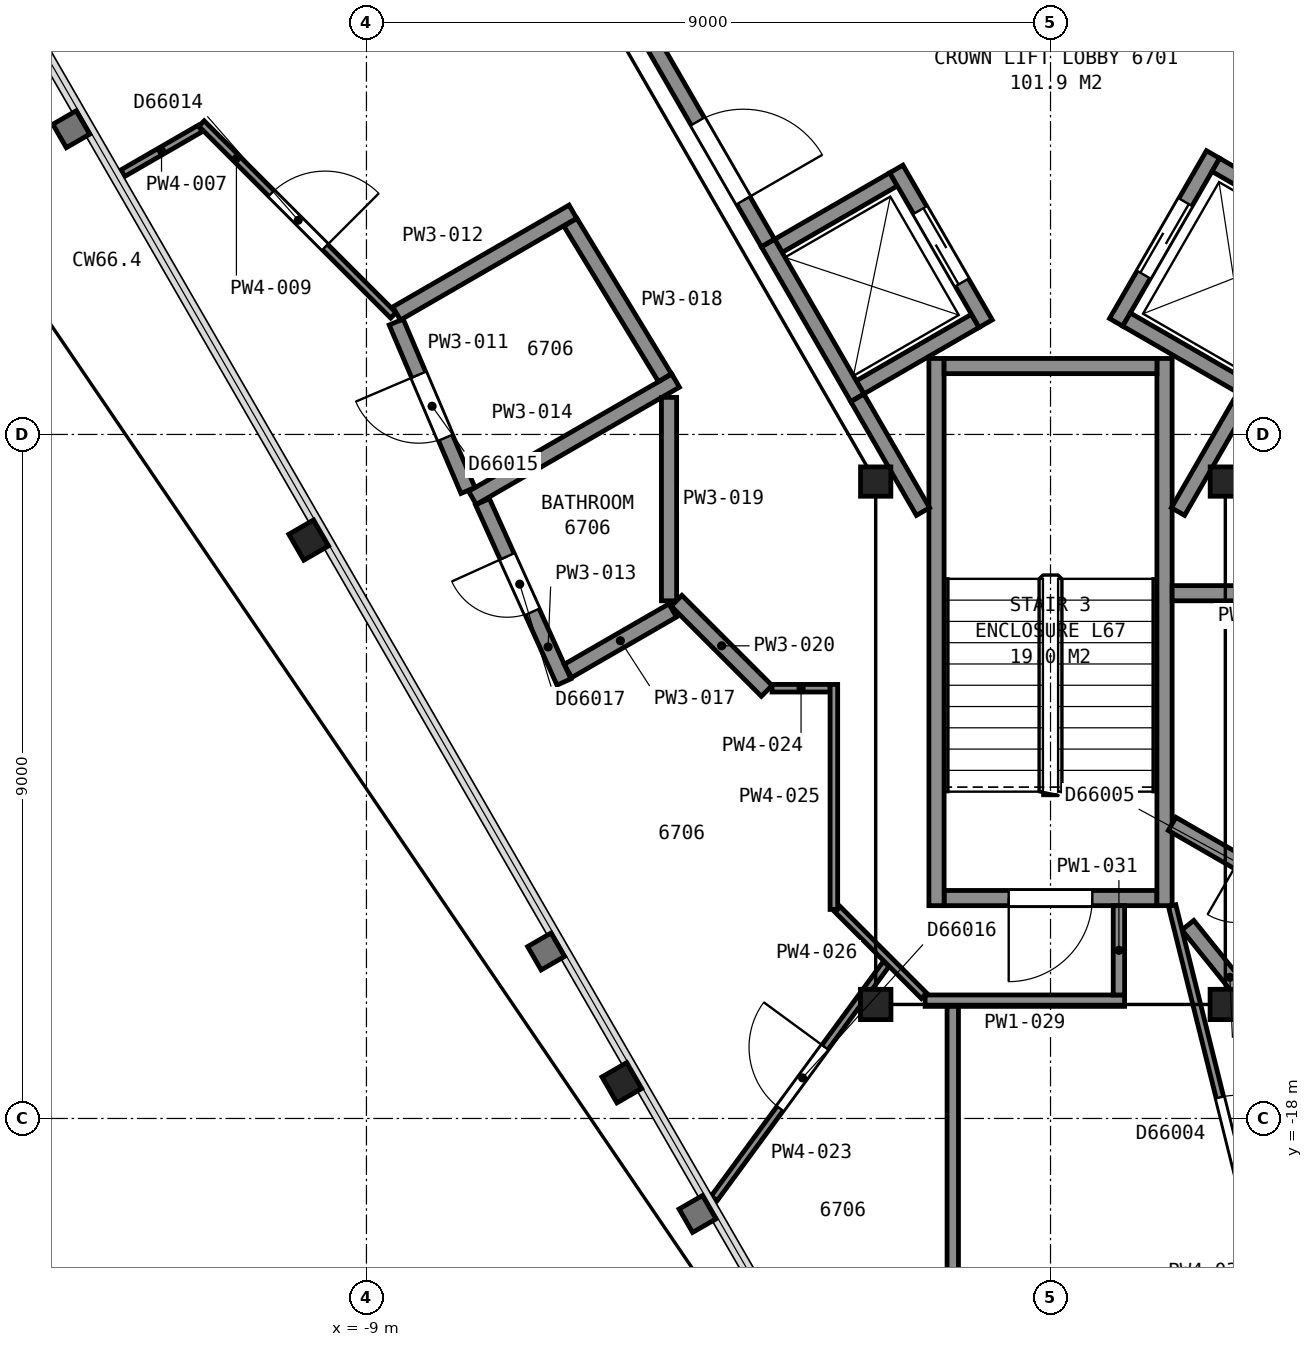
"""IFC4 building model, lengths in metres.
Left out: names, types, materials, properties, quantities, classifications, styles, units other than length and angle.
Written with IfcOpenShell. Run it as: python <this file> out.ifc"""

import sys

from ifc_helpers import new_model, si_unit, direction, frame, frame_2d, origin, origin_2d, place, context, subcontext, project, spatial, rectangle, i_section, extrude, element, fill, save


model = new_model("IFC4")
c1 = context("Model", 3, precision=1e-05, world=origin(), true_north=direction((0.0, 1.0)))
c2 = subcontext(c1, "Body", "Model", "MODEL_VIEW")
j1 = project(units=[si_unit("LENGTHUNIT", "METRE"), si_unit("PLANEANGLEUNIT", "RADIAN")], contexts=[c1])
p1 = place(None, origin())
s1 = spatial("IfcSite", under=j1, at=p1, CompositionType="ELEMENT")
p2 = place(p1, origin())
s2 = spatial("IfcBuilding", under=s1, at=p2, CompositionType="ELEMENT")
p3 = place(p2, frame((0.0, 0.0, 267.7)))
s3 = spatial("IfcBuildingStorey", under=s2, at=p3, CompositionType="ELEMENT", Elevation=267.7)
for number, where, z_axis, x_axis in (
    (1, (-9.76, -10.39, 0.0), (0.0, 0.0, 1.0), (-0.5, 0.866, 0.0)),
    (2, (-5.64, -17.53, 0.0), (0.0, 0.0, 1.0), (-0.5, 0.866, 0.0)),
):
    element("IfcColumn", number, at=place(p3, frame(where, z_axis=z_axis, x_axis=x_axis)), inside=s3, PredefinedType="COLUMN", context=c2, shape_type="SweptSolid", body=[
        extrude(i_section(OverallWidth=0.394, OverallDepth=0.376, WebThickness=0.017, FlangeThickness=0.028, FilletRadius=0.015, at=origin_2d()), origin(), (0.0, 0.0, 1.0), 3.7),
    ])
p4 = place(p3, frame((-2.3, -9.62, 0.0), z_axis=(0.0, 0.0, 1.0), x_axis=(1.0, 0.0, 0.0)))
e3 = element("IfcColumn", 3, at=p4, inside=s3, PredefinedType="COLUMN", context=c2, shape_type="SweptSolid", body=[
    extrude(i_section(OverallWidth=0.399, OverallDepth=0.386, WebThickness=0.021, FlangeThickness=0.033, FilletRadius=0.015, at=origin_2d()), origin(), (0.0, 0.0, 1.0), 3.7),
])
for number, where, z_axis, x_axis in (
    (4, (-2.3, -16.5, 0.0), (0.0, 0.0, 1.0), (-1.0, 0.0, 0.0)),
    (5, (2.3, -16.5, 0.0), (0.0, 0.0, 1.0), (-1.0, 0.0, 0.0)),
):
    element("IfcColumn", number, at=place(p3, frame(where, z_axis=z_axis, x_axis=x_axis)), inside=s3, PredefinedType="COLUMN", context=c2, shape_type="SweptSolid", body=[
        extrude(i_section(OverallWidth=0.401, OverallDepth=0.399, WebThickness=0.025, FlangeThickness=0.04, FilletRadius=0.015, at=origin_2d()), origin(), (0.0, 0.0, 1.0), 3.7),
    ])
p5 = place(p3, frame((2.3, -9.62, 0.0), z_axis=(0.0, 0.0, 1.0), x_axis=(1.0, 0.0, 0.0)))
e6 = element("IfcColumn", 6, at=p5, inside=s3, PredefinedType="COLUMN", context=c2, shape_type="SweptSolid", body=[
    extrude(i_section(OverallWidth=0.399, OverallDepth=0.386, WebThickness=0.021, FlangeThickness=0.033, FilletRadius=0.015, at=origin_2d()), origin(), (0.0, 0.0, 1.0), 3.7),
])
p6 = place(p3, frame((-1.4, -15.1, 0.0), z_axis=(0.0, 0.0, 1.0), x_axis=(1.0, 0.0, 0.0)))
e7 = element("IfcWall", 7, at=p6, inside=s3, PredefinedType="PARTITIONING", context=c2, shape_type="SweptSolid", body=[
    extrude(rectangle(XDim=2.8, YDim=0.2, at=frame_2d((1.4, 0.0))), origin(), (0.0, 0.0, 1.0), 3.45),
])
p7 = place(p6, frame((0.85, 0.0, 0.0)))
e8 = element("IfcOpeningElement", 8, at=p7, cuts=e7, PredefinedType="OPENING", context=c2, shape_type="SweptSolid", body=[
    extrude(rectangle(XDim=1.1, YDim=2.1, at=frame_2d((0.55, 1.05))), frame((0.0, 0.11, 0.0), z_axis=(0.0, -1.0, 0.0), x_axis=(1.0, 0.0, 0.0)), (0.0, 0.0, 1.0), 0.22),
])
for number, where, z_axis, x_axis in (
    (9, (1.5, -8.0, 0.0), (0.0, 0.0, 1.0), (0.0, -1.0, 0.0)),
    (10, (-1.5, -8.0, 0.0), (0.0, 0.0, 1.0), (0.0, -1.0, 0.0)),
):
    element("IfcWall", number, at=place(p3, frame(where, z_axis=z_axis, x_axis=x_axis)), inside=s3, PredefinedType="PARTITIONING", context=c2, shape_type="SweptSolid", body=[
        extrude(rectangle(XDim=7.2, YDim=0.2, at=frame_2d((3.6, 0.0))), origin(), (0.0, 0.0, 1.0), 3.45),
    ])
p8 = place(p3, frame((-1.4, -8.1, 0.0), z_axis=(0.0, 0.0, 1.0), x_axis=(1.0, 0.0, 0.0)))
e11 = element("IfcWall", 11, at=p8, inside=s3, PredefinedType="PARTITIONING", context=c2, shape_type="SweptSolid", body=[
    extrude(rectangle(XDim=2.8, YDim=0.2, at=frame_2d((1.4, 0.0))), origin(), (0.0, 0.0, 1.0), 3.45),
])
for number, where, z_axis, x_axis in (
    (12, (-2.505, -8.38, 0.0), (0.0, 0.0, 1.0), (0.866, 0.5, 0.0)),
    (13, (-3.58, -6.519, 0.0), (0.0, 0.0, 1.0), (0.866, 0.5, 0.0)),
):
    element("IfcWall", number, at=place(p3, frame(where, z_axis=z_axis, x_axis=x_axis)), inside=s3, PredefinedType="PARTITIONING", context=c2, shape_type="SweptSolid", body=[
        extrude(rectangle(XDim=1.75, YDim=0.2, at=frame_2d((0.875, 0.0))), origin(), (0.0, 0.0, 1.0), 3.7),
    ])
p9 = place(p3, frame((0.863, -7.525, 0.0), z_axis=(0.0, 0.0, 1.0), x_axis=(0.499990435942, 0.866030925526, 0.0)))
e14 = element("IfcWall", 14, at=p9, inside=s3, PredefinedType="PARTITIONING", context=c2, shape_type="SweptSolid", body=[
    extrude(rectangle(XDim=2.55, YDim=0.2, at=frame_2d((1.275, 0.0))), origin(), (0.0, 0.0, 1.0), 3.7),
])
p10 = place(p9, frame((0.725, 0.0, 0.0)))
e15 = element("IfcOpeningElement", 15, at=p10, cuts=e14, PredefinedType="OPENING", context=c2, shape_type="SweptSolid", body=[
    extrude(rectangle(XDim=1.1, YDim=2.1, at=frame_2d((0.55, 1.05))), frame((0.0, 0.11, 0.0), z_axis=(0.0, -1.0, 0.0), x_axis=(1.0, 0.0, 0.0)), (0.0, 0.0, 1.0), 0.22),
])
p11 = place(p3, frame((-0.853, -7.542, 0.0), z_axis=(0.0, 0.0, 1.0), x_axis=(-0.500016218704, 0.866016039709, 0.0)))
e16 = element("IfcWall", 16, at=p11, inside=s3, PredefinedType="PARTITIONING", context=c2, shape_type="SweptSolid", body=[
    extrude(rectangle(XDim=2.35, YDim=0.2, at=frame_2d((1.175, 0.0))), origin(), (0.0, 0.0, 1.0), 3.7),
])
p12 = place(p11, frame((0.625, 0.0, 0.0)))
e17 = element("IfcOpeningElement", 17, at=p12, cuts=e16, PredefinedType="OPENING", context=c2, shape_type="SweptSolid", body=[
    extrude(rectangle(XDim=1.1, YDim=2.1, at=frame_2d((0.55, 1.05))), frame((0.0, 0.11, 0.0), z_axis=(0.0, -1.0, 0.0), x_axis=(1.0, 0.0, 0.0)), (0.0, 0.0, 1.0), 0.22),
])
p13 = place(p3, frame((-2.542, -8.517, 0.0), z_axis=(0.0, 0.0, 1.0), x_axis=(-0.500016218704, 0.866016039709, 0.0)))
e18 = element("IfcWall", 18, at=p13, inside=s3, PredefinedType="PARTITIONING", context=c2, shape_type="SweptSolid", body=[
    extrude(rectangle(XDim=2.35, YDim=0.2, at=frame_2d((1.175, 0.0))), origin(), (0.0, 0.0, 1.0), 3.7),
])
for number, where, z_axis, x_axis in (
    (19, (3.69, -6.328, 0.0), (0.0, 0.0, 1.0), (-0.866, 0.5, 0.0)),
    (20, (2.515, -8.363, 0.0), (0.0, 0.0, 1.0), (-0.866, 0.5, 0.0)),
):
    element("IfcWall", number, at=place(p3, frame(where, z_axis=z_axis, x_axis=x_axis)), inside=s3, PredefinedType="PARTITIONING", context=c2, shape_type="SweptSolid", body=[
        extrude(rectangle(XDim=1.75, YDim=0.2, at=frame_2d((0.875, 0.0))), origin(), (0.0, 0.0, 1.0), 3.7),
    ])
p14 = place(p3, frame((-7.141, -0.551, 0.0), z_axis=(0.0, 0.0, 1.0), x_axis=(0.500001302854, -0.86602465158, 0.0)))
e21 = element("IfcWall", 21, at=p14, inside=s3, PredefinedType="PARTITIONING", context=c2, shape_type="SweptSolid", body=[
    extrude(rectangle(XDim=6.846, YDim=0.2, at=frame_2d((3.423, 0.0))), origin(), (0.0, 0.0, 1.0), 3.45),
])
p15 = place(p14, frame((5.0, 0.0, 0.0)))
e22 = element("IfcOpeningElement", 22, at=p15, cuts=e21, PredefinedType="OPENING", context=c2, shape_type="SweptSolid", body=[
    extrude(rectangle(XDim=1.2, YDim=2.1, at=frame_2d((0.6, 1.05))), frame((0.0, 0.11, 0.0), z_axis=(0.0, -1.0, 0.0), x_axis=(1.0, 0.0, 0.0)), (0.0, 0.0, 1.0), 0.22),
])
p16 = place(p3, frame((-2.541, -8.519, 0.0), z_axis=(0.0, 0.0, 1.0), x_axis=(0.500016142392, -0.86601608377, 0.0)))
e23 = element("IfcWall", 23, at=p16, inside=s3, PredefinedType="PARTITIONING", context=c2, shape_type="SweptSolid", body=[
    extrude(rectangle(XDim=1.727, YDim=0.2, at=frame_2d((0.864, 0.0))), origin(), (0.0, 0.0, 1.0), 3.45),
])
p17 = place(p3, frame((1.677, -10.015, 0.0), z_axis=(0.0, 0.0, 1.0), x_axis=(0.49983532306, 0.866120459187, 0.0)))
e24 = element("IfcWall", 24, at=p17, inside=s3, PredefinedType="PARTITIONING", context=c2, shape_type="SweptSolid", body=[
    extrude(rectangle(XDim=1.748, YDim=0.2, at=frame_2d((0.874, 0.0))), origin(), (0.0, 0.0, 1.0), 3.45),
])
p18 = place(p3, frame((-12.205, -5.562, 0.0), z_axis=(0.0, 0.0, 1.0), x_axis=(0.865895054285, 0.500225704022, 0.0)))
e25 = element("IfcWall", 25, at=p18, inside=s3, PredefinedType="PARTITIONING", context=c2, shape_type="SweptSolid", body=[
    extrude(rectangle(XDim=1.176, YDim=0.1, at=frame_2d((0.588, 0.0))), origin(), (0.0, 0.0, 1.0), 2.723),
])
p19 = place(p3, frame((-8.646, -7.433, 0.0), z_axis=(0.0, 0.0, 1.0), x_axis=(-0.707106781187, 0.707106781187, 0.0)))
e26 = element("IfcWall", 26, at=p19, inside=s3, PredefinedType="PARTITIONING", context=c2, shape_type="SweptSolid", body=[
    extrude(rectangle(XDim=3.57, YDim=0.1, at=frame_2d((1.785, 0.0))), origin(), (0.0, 0.0, 1.0), 2.723),
])
p20 = place(p19, frame((1.27, 0.0, 0.0)))
e27 = element("IfcOpeningElement", 27, at=p20, cuts=e26, PredefinedType="OPENING", context=c2, shape_type="SweptSolid", body=[
    extrude(rectangle(XDim=1.0, YDim=2.1, at=frame_2d((0.5, 1.05))), frame((0.0, 0.06, 0.0), z_axis=(0.0, -1.0, 0.0), x_axis=(1.0, 0.0, 0.0)), (0.0, 0.0, 1.0), 0.12),
])
p21 = place(p3, frame((-8.609, -7.521, 0.0), z_axis=(0.0, 0.0, 1.0), x_axis=(0.391998641344, -0.91996579566, 0.0)))
e28 = element("IfcWall", 28, at=p21, inside=s3, PredefinedType="PARTITIONING", context=c2, shape_type="SweptSolid", body=[
    extrude(rectangle(XDim=2.41, YDim=0.2, at=frame_2d((1.205, 0.0))), origin(), (0.0, 0.0, 1.0), 2.723),
])
p22 = place(p21, frame((0.755, 0.0, 0.0)))
e29 = element("IfcOpeningElement", 29, at=p22, cuts=e28, PredefinedType="OPENING", context=c2, shape_type="SweptSolid", body=[
    extrude(rectangle(XDim=0.9, YDim=2.1, at=frame_2d((0.45, 1.05))), frame((0.0, 0.11, 0.0), z_axis=(0.0, -1.0, 0.0), x_axis=(1.0, 0.0, 0.0)), (0.0, 0.0, 1.0), 0.22),
])
p23 = place(p3, frame((-8.603, -7.408, 0.0), z_axis=(0.0, 0.0, 1.0), x_axis=(0.865966883336, 0.500101346695, 0.0)))
e30 = element("IfcWall", 30, at=p23, inside=s3, PredefinedType="PARTITIONING", context=c2, shape_type="SweptSolid", body=[
    extrude(rectangle(XDim=2.677, YDim=0.2, at=frame_2d((1.339, 0.0))), origin(), (0.0, 0.0, 1.0), 2.723),
])
p24 = place(p3, frame((-7.474, -9.885, 0.0), z_axis=(0.0, 0.0, 1.0), x_axis=(0.411787773138, -0.911279775862, 0.0)))
e31 = element("IfcWall", 31, at=p24, inside=s3, PredefinedType="PARTITIONING", context=c2, shape_type="SweptSolid", body=[
    extrude(rectangle(XDim=2.603, YDim=0.2, at=frame_2d((1.301, 0.0))), origin(), (0.0, 0.0, 1.0), 2.723),
])
p25 = place(p24, frame((0.79, 0.0, 0.0)))
e32 = element("IfcOpeningElement", 32, at=p25, cuts=e31, PredefinedType="OPENING", context=c2, shape_type="SweptSolid", body=[
    extrude(rectangle(XDim=0.8, YDim=2.1, at=frame_2d((0.4, 1.05))), frame((0.0, 0.11, 0.0), z_axis=(0.0, -1.0, 0.0), x_axis=(1.0, 0.0, 0.0)), (0.0, 0.0, 1.0), 0.22),
])
p26 = place(p3, frame((-7.606, -9.835, 0.0), z_axis=(0.0, 0.0, 1.0), x_axis=(0.866093395895, 0.499882215713, 0.0)))
e33 = element("IfcWall", 33, at=p26, inside=s3, PredefinedType="PARTITIONING", context=c2, shape_type="SweptSolid", body=[
    extrude(rectangle(XDim=3.087, YDim=0.2, at=frame_2d((1.543, 0.0))), origin(), (0.0, 0.0, 1.0), 2.723),
])
p27 = place(p3, frame((-6.348, -12.111, 0.0), z_axis=(0.0, 0.0, 1.0), x_axis=(0.866004001318, 0.500037068326, 0.0)))
e34 = element("IfcWall", 34, at=p27, inside=s3, PredefinedType="PARTITIONING", context=c2, shape_type="SweptSolid", body=[
    extrude(rectangle(XDim=1.59, YDim=0.2, at=frame_2d((0.795, 0.0))), origin(), (0.0, 0.0, 1.0), 2.723),
])
p28 = place(p3, frame((-6.316, -6.209, 0.0), z_axis=(0.0, 0.0, 1.0), x_axis=(0.519665190876, -0.854369995606, 0.0)))
e35 = element("IfcWall", 35, at=p28, inside=s3, PredefinedType="PARTITIONING", context=c2, shape_type="SweptSolid", body=[
    extrude(rectangle(XDim=2.392, YDim=0.2, at=frame_2d((1.196, 0.0))), origin(), (0.0, 0.0, 1.0), 2.723),
])
p29 = place(p3, frame((-5.019, -11.189, 0.0), z_axis=(0.0, 0.0, 1.0), x_axis=(0.0, 1.0, 0.0)))
e36 = element("IfcWall", 36, at=p29, inside=s3, PredefinedType="PARTITIONING", context=c2, shape_type="SweptSolid", body=[
    extrude(rectangle(XDim=2.677, YDim=0.2, at=frame_2d((1.338, 0.0))), origin(), (0.0, 0.0, 1.0), 2.723),
])
p30 = place(p3, frame((-4.92, -11.188, 0.0), z_axis=(0.0, 0.0, 1.0), x_axis=(0.707106781187, -0.707106781187, 0.0)))
e37 = element("IfcWall", 37, at=p30, inside=s3, PredefinedType="PARTITIONING", context=c2, shape_type="SweptSolid", body=[
    extrude(rectangle(XDim=1.678, YDim=0.2, at=frame_2d((0.839, 0.0))), origin(), (0.0, 0.0, 1.0), 2.723),
])
p31 = place(p3, frame((-2.164, -15.968, 0.0), z_axis=(0.0, 0.0, 1.0), x_axis=(-0.591435630084, -0.806352215516, 0.0)))
e38 = element("IfcWall", 38, at=p31, inside=s3, PredefinedType="PARTITIONING", context=c2, shape_type="SweptSolid", body=[
    extrude(rectangle(XDim=3.824, YDim=0.1, at=frame_2d((1.912, 0.0))), origin(), (0.0, 0.0, 1.0), 2.723),
])
p32 = place(p31, frame((1.358, 0.0, 0.0)))
e39 = element("IfcOpeningElement", 39, at=p32, cuts=e38, PredefinedType="OPENING", context=c2, shape_type="SweptSolid", body=[
    extrude(rectangle(XDim=1.0, YDim=2.1, at=frame_2d((0.5, 1.05))), frame((0.0, 0.06, 0.0), z_axis=(0.0, -1.0, 0.0), x_axis=(1.0, 0.0, 0.0)), (0.0, 0.0, 1.0), 0.12),
])
p33 = place(p3, frame((-3.664, -12.339, 0.0), z_axis=(0.0, 0.0, 1.0), x_axis=(1.0, 0.0, 0.0)))
e40 = element("IfcWall", 40, at=p33, inside=s3, PredefinedType="PARTITIONING", context=c2, shape_type="SweptSolid", body=[
    extrude(rectangle(XDim=0.764, YDim=0.1, at=frame_2d((0.382, 0.0))), origin(), (0.0, 0.0, 1.0), 2.723),
])
p34 = place(p3, frame((-2.85, -15.25, 0.0), z_axis=(0.0, 0.0, 1.0), x_axis=(0.0, 1.0, 0.0)))
e41 = element("IfcWall", 41, at=p34, inside=s3, PredefinedType="PARTITIONING", context=c2, shape_type="SweptSolid", body=[
    extrude(rectangle(XDim=2.961, YDim=0.1, at=frame_2d((1.48, 0.0))), origin(), (0.0, 0.0, 1.0), 2.723),
])
p35 = place(p3, frame((-2.801, -15.25, 0.0), z_axis=(0.0, 0.0, 1.0), x_axis=(0.707106781187, -0.707106781187, 0.0)))
e42 = element("IfcWall", 42, at=p35, inside=s3, PredefinedType="PARTITIONING", context=c2, shape_type="SweptSolid", body=[
    extrude(rectangle(XDim=1.608, YDim=0.1, at=frame_2d((0.804, 0.0))), origin(), (0.0, 0.0, 1.0), 2.723),
])
p36 = place(p3, frame((-1.65, -16.45, 0.0), z_axis=(0.0, 0.0, 1.0), x_axis=(1.0, 0.0, 0.0)))
e43 = element("IfcWall", 43, at=p36, inside=s3, PredefinedType="PARTITIONING", context=c2, shape_type="SweptSolid", body=[
    extrude(rectangle(XDim=2.625, YDim=0.15, at=frame_2d((1.312, 0.0))), origin(), (0.0, 0.0, 1.0), 2.723),
])
p37 = place(p3, frame((-1.286, -24.421, 0.0), z_axis=(0.0, 0.0, 1.0), x_axis=(0.0, 1.0, 0.0)))
e44 = element("IfcWall", 44, at=p37, inside=s3, PredefinedType="PARTITIONING", context=c2, shape_type="SweptSolid", body=[
    extrude(rectangle(XDim=7.896, YDim=0.15, at=frame_2d((3.948, 0.0))), origin(), (0.0, 0.0, 1.0), 2.723),
])
p38 = place(p3, frame((0.9, -16.375, 0.0), z_axis=(0.0, 0.0, 1.0), x_axis=(0.0, 1.0, 0.0)))
e45 = element("IfcWall", 45, at=p38, inside=s3, PredefinedType="PARTITIONING", context=c2, shape_type="SweptSolid", body=[
    extrude(rectangle(XDim=1.175, YDim=0.15, at=frame_2d((0.587, 0.0))), origin(), (0.0, 0.0, 1.0), 2.723),
])
p39 = place(p3, frame((1.807, -15.457, 0.0), z_axis=(0.0, 0.0, 1.0), x_axis=(0.62721044395, -0.778849830841, 0.0)))
e46 = element("IfcWall", 46, at=p39, inside=s3, PredefinedType="PARTITIONING", context=c2, shape_type="SweptSolid", body=[
    extrude(rectangle(XDim=1.761, YDim=0.2, at=frame_2d((0.881, 0.0))), origin(), (0.0, 0.0, 1.0), 2.723),
])
p40 = place(p3, frame((3.127, -21.335, 0.0), z_axis=(0.0, 0.0, 1.0), x_axis=(-0.241554155251, 0.970387340231, 0.0)))
e47 = element("IfcWall", 47, at=p40, inside=s3, PredefinedType="PARTITIONING", context=c2, shape_type="SweptSolid", body=[
    extrude(rectangle(XDim=6.322, YDim=0.1, at=frame_2d((3.161, 0.0))), origin(), (0.0, 0.0, 1.0), 2.723),
])
p41 = place(p40, frame((2.722, 0.0, 0.0)))
e48 = element("IfcOpeningElement", 48, at=p41, cuts=e47, PredefinedType="OPENING", context=c2, shape_type="SweptSolid", body=[
    extrude(rectangle(XDim=1.0, YDim=2.1, at=frame_2d((0.5, 1.05))), frame((0.0, 0.06, 0.0), z_axis=(0.0, -1.0, 0.0), x_axis=(1.0, 0.0, 0.0)), (0.0, 0.0, 1.0), 0.12),
])
p42 = place(p3, frame((4.144, -15.593, 0.0), z_axis=(0.0, 0.0, 1.0), x_axis=(-0.865947474014, 0.500134954036, 0.0)))
e49 = element("IfcWall", 49, at=p42, inside=s3, PredefinedType="PARTITIONING", context=c2, shape_type="SweptSolid", body=[
    extrude(rectangle(XDim=2.937, YDim=0.2, at=frame_2d((1.469, 0.0))), origin(), (0.0, 0.0, 1.0), 2.723),
])
p43 = place(p42, frame((1.137, 0.0, 0.0)))
e50 = element("IfcOpeningElement", 50, at=p43, cuts=e49, PredefinedType="OPENING", context=c2, shape_type="SweptSolid", body=[
    extrude(rectangle(XDim=0.8, YDim=2.1, at=frame_2d((0.4, 1.05))), frame((0.0, 0.11, 0.0), z_axis=(0.0, -1.0, 0.0), x_axis=(1.0, 0.0, 0.0)), (0.0, 0.0, 1.0), 0.22),
])
p44 = place(p3, frame((1.6, -11.089, 0.0), z_axis=(0.0, 0.0, 1.0), x_axis=(1.0, 0.0, 0.0)))
e51 = element("IfcWall", 51, at=p44, inside=s3, PredefinedType="PARTITIONING", context=c2, shape_type="SweptSolid", body=[
    extrude(rectangle(XDim=2.269, YDim=0.2, at=frame_2d((1.134, 0.0))), origin(), (0.0, 0.0, 1.0), 2.723),
])
p45 = place(p7, origin())
e52 = element("IfcDoor", 52, at=p45, inside=s3, OperationType="SINGLE_SWING_LEFT", PredefinedType="DOOR", context=c2, shape_type="SweptSolid", body=[
    extrude(rectangle(XDim=1.1, YDim=2.1, at=frame_2d((0.55, 1.05))), frame((0.0, 0.025, 0.0), z_axis=(0.0, -1.0, 0.0), x_axis=(1.0, 0.0, 0.0)), (0.0, 0.0, 1.0), 0.05),
])
fill(e8, e52)
p46 = place(p12, origin())
e53 = element("IfcDoor", 53, at=p46, inside=s3, OperationType="SLIDING_TO_LEFT", PredefinedType="DOOR", context=c2, shape_type="SweptSolid", body=[
    extrude(rectangle(XDim=1.1, YDim=2.1, at=frame_2d((0.55, 1.05))), frame((0.0, 0.025, 0.0), z_axis=(0.0, -1.0, 0.0), x_axis=(1.0, 0.0, 0.0)), (0.0, 0.0, 1.0), 0.05),
])
fill(e17, e53)
p47 = place(p10, origin())
e54 = element("IfcDoor", 54, at=p47, inside=s3, OperationType="SLIDING_TO_LEFT", PredefinedType="DOOR", context=c2, shape_type="SweptSolid", body=[
    extrude(rectangle(XDim=1.1, YDim=2.1, at=frame_2d((0.55, 1.05))), frame((0.0, 0.025, 0.0), z_axis=(0.0, -1.0, 0.0), x_axis=(1.0, 0.0, 0.0)), (0.0, 0.0, 1.0), 0.05),
])
fill(e15, e54)
p48 = place(p15, origin())
e55 = element("IfcDoor", 55, at=p48, inside=s3, OperationType="SINGLE_SWING_RIGHT", PredefinedType="DOOR", context=c2, shape_type="SweptSolid", body=[
    extrude(rectangle(XDim=1.2, YDim=2.1, at=frame_2d((0.6, 1.05))), frame((0.0, 0.025, 0.0), z_axis=(0.0, -1.0, 0.0), x_axis=(1.0, 0.0, 0.0)), (0.0, 0.0, 1.0), 0.05),
])
fill(e22, e55)
p49 = place(p20, origin())
e56 = element("IfcDoor", 56, at=p49, inside=s3, OperationType="SINGLE_SWING_LEFT", PredefinedType="DOOR", context=c2, shape_type="SweptSolid", body=[
    extrude(rectangle(XDim=1.0, YDim=2.1, at=frame_2d((0.5, 1.05))), frame((0.0, 0.025, 0.0), z_axis=(0.0, -1.0, 0.0), x_axis=(1.0, 0.0, 0.0)), (0.0, 0.0, 1.0), 0.05),
])
fill(e27, e56)
p50 = place(p22, origin())
e57 = element("IfcDoor", 57, at=p50, inside=s3, OperationType="SINGLE_SWING_LEFT", PredefinedType="DOOR", context=c2, shape_type="SweptSolid", body=[
    extrude(rectangle(XDim=0.9, YDim=2.1, at=frame_2d((0.45, 1.05))), frame((0.0, 0.025, 0.0), z_axis=(0.0, -1.0, 0.0), x_axis=(1.0, 0.0, 0.0)), (0.0, 0.0, 1.0), 0.05),
])
fill(e29, e57)
p51 = place(p25, origin())
e58 = element("IfcDoor", 58, at=p51, inside=s3, OperationType="SINGLE_SWING_LEFT", PredefinedType="DOOR", context=c2, shape_type="SweptSolid", body=[
    extrude(rectangle(XDim=0.8, YDim=2.1, at=frame_2d((0.4, 1.05))), frame((0.0, 0.025, 0.0), z_axis=(0.0, -1.0, 0.0), x_axis=(1.0, 0.0, 0.0)), (0.0, 0.0, 1.0), 0.05),
])
fill(e32, e58)
p52 = place(p32, origin())
e59 = element("IfcDoor", 59, at=p52, inside=s3, OperationType="SINGLE_SWING_LEFT", PredefinedType="DOOR", context=c2, shape_type="SweptSolid", body=[
    extrude(rectangle(XDim=1.0, YDim=2.1, at=frame_2d((0.5, 1.05))), frame((0.0, 0.025, 0.0), z_axis=(0.0, -1.0, 0.0), x_axis=(1.0, 0.0, 0.0)), (0.0, 0.0, 1.0), 0.05),
])
fill(e39, e59)
p53 = place(p41, origin())
e60 = element("IfcDoor", 60, at=p53, inside=s3, OperationType="SINGLE_SWING_LEFT", PredefinedType="DOOR", context=c2, shape_type="SweptSolid", body=[
    extrude(rectangle(XDim=1.0, YDim=2.1, at=frame_2d((0.5, 1.05))), frame((0.0, 0.025, 0.0), z_axis=(0.0, -1.0, 0.0), x_axis=(1.0, 0.0, 0.0)), (0.0, 0.0, 1.0), 0.05),
])
fill(e48, e60)
save(model, sys.argv[1])
